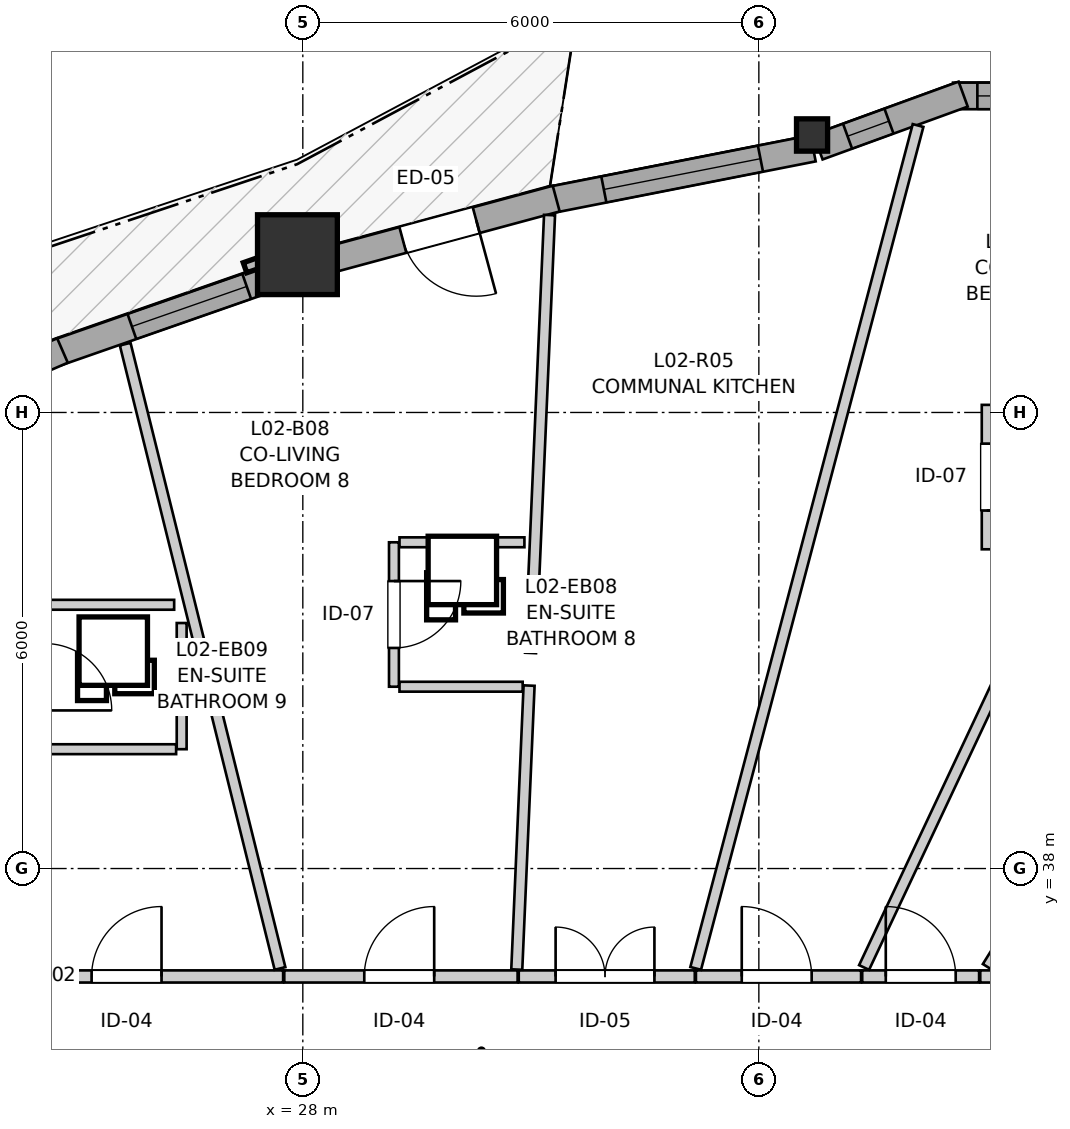
"""IFC4 building model, lengths in metres.
Left out: names, types, materials, properties, quantities, classifications, styles, units other than length and angle.
Written with IfcOpenShell. Run it as: python <this file> out.ifc"""

import sys

from ifc_helpers import new_model, si_unit, direction, frame, frame_2d, origin, origin_2d, place, context, subcontext, project, spatial, rectangle, i_section, extrude, source, transform, mapped, element, fill, save


model = new_model("IFC4")
c1 = context("Model", 3, precision=1e-05, world=origin(), true_north=direction((0.0, 1.0)))
c2 = subcontext(c1, "Body", "Model", "MODEL_VIEW")
j1 = project(units=[si_unit("LENGTHUNIT", "METRE"), si_unit("PLANEANGLEUNIT", "RADIAN")], contexts=[c1])
p1 = place(None, origin())
s1 = spatial("IfcSite", under=j1, at=p1, CompositionType="ELEMENT")
p2 = place(p1, origin())
s2 = spatial("IfcBuilding", under=s1, at=p2, CompositionType="ELEMENT")
p3 = place(p2, frame((0.0, 0.0, 11.0)))
s3 = spatial("IfcBuildingStorey", under=s2, at=p3, CompositionType="ELEMENT", Elevation=11.0)
m1 = source(origin(), c2, "Body", "SweptSolid", [
    extrude(i_section(OverallWidth=0.409, OverallDepth=0.425, WebThickness=0.03, FlangeThickness=0.048, FilletRadius=0.015, at=origin_2d()), origin(), (0.0, 0.0, 1.0), 2.94),
])
p4 = place(p3, frame((34.7, 47.651, 0.0), z_axis=(0.0, 0.0, 1.0), x_axis=(1.0, 0.0, 0.0)))
e1 = element("IfcColumn", 1, at=p4, inside=s3, PredefinedType="PILASTER", context=c2, shape_type="MappedRepresentation", body=[
    mapped(m1, transform((0.0, 0.0, 0.0), x_axis=(1.0, 0.0, 0.0), y_axis=(0.0, 1.0, 0.0), z_axis=(0.0, 0.0, 1.0), scale=1.0)),
])
m2 = source(origin(), c2, "Body", "SweptSolid", [
    extrude(rectangle(XDim=1.05, YDim=1.05, at=origin_2d()), origin(), (0.0, 0.0, 1.0), 2.94),
])
p5 = place(p3, frame((27.929, 46.076, 0.0), z_axis=(0.0, 0.0, 1.0), x_axis=(1.0, 0.0, 0.0)))
e2 = element("IfcColumn", 2, at=p5, inside=s3, PredefinedType="COLUMN", context=c2, shape_type="MappedRepresentation", body=[
    mapped(m2, transform((0.0, 0.0, 0.0), x_axis=(1.0, 0.0, 0.0), y_axis=(0.0, 1.0, 0.0), z_axis=(0.0, 0.0, 1.0), scale=1.0)),
])
p6 = place(p3, frame((38.645, 48.165, 0.0), z_axis=(0.0, 0.0, 1.0), x_axis=(-1.0, 0.0, 0.0)))
e3 = element("IfcWall", 3, at=p6, inside=s3, PredefinedType="SOLIDWALL", context=c2, shape_type="SweptSolid", body=[
    extrude(rectangle(XDim=2.091, YDim=0.35, at=frame_2d((1.045, 0.0))), origin(), (0.0, 0.0, 1.0), 2.42),
])
p7 = place(p6, frame((0.32, 0.0, 0.82)))
e4 = element("IfcOpeningElement", 4, at=p7, cuts=e3, PredefinedType="OPENING", context=c2, shape_type="SweptSolid", body=[
    extrude(rectangle(XDim=1.45, YDim=1.25, at=frame_2d((0.725, 0.625))), frame((0.0, 0.185, 0.0), z_axis=(0.0, -1.0, 0.0), x_axis=(1.0, 0.0, 0.0)), (0.0, 0.0, 1.0), 0.37),
])
p8 = place(p3, frame((36.688, 48.188, 0.0), z_axis=(0.0, 0.0, 1.0), x_axis=(-0.939653047052, -0.342128851701, 0.0)))
e5 = element("IfcWall", 5, at=p8, inside=s3, PredefinedType="SOLIDWALL", context=c2, shape_type="SweptSolid", body=[
    extrude(rectangle(XDim=2.032, YDim=0.35, at=frame_2d((1.016, 0.0))), origin(), (0.0, 0.0, 1.0), 2.42),
])
p9 = place(p8, frame((1.039, 0.0, 0.82)))
e6 = element("IfcOpeningElement", 6, at=p9, cuts=e5, PredefinedType="OPENING", context=c2, shape_type="SweptSolid", body=[
    extrude(rectangle(XDim=0.58, YDim=1.35, at=frame_2d((0.29, 0.675))), frame((0.0, 0.185, 0.0), z_axis=(0.0, -1.0, 0.0), x_axis=(1.0, 0.0, 0.0)), (0.0, 0.0, 1.0), 0.37),
])
p10 = place(p3, frame((34.714, 47.475, 0.0), z_axis=(0.0, 0.0, 1.0), x_axis=(-0.981221268425, -0.192885516282, 0.0)))
e7 = element("IfcWall", 7, at=p10, inside=s3, PredefinedType="SOLIDWALL", context=c2, shape_type="SweptSolid", body=[
    extrude(rectangle(XDim=3.533, YDim=0.35, at=frame_2d((1.766, 0.0))), origin(), (0.0, 0.0, 1.0), 2.42),
])
p11 = place(p10, frame((0.706, 0.0, 0.82)))
e8 = element("IfcOpeningElement", 8, at=p11, cuts=e7, PredefinedType="OPENING", context=c2, shape_type="SweptSolid", body=[
    extrude(rectangle(XDim=2.1, YDim=1.4, at=frame_2d((1.05, 0.7))), frame((0.0, 0.185, 0.0), z_axis=(0.0, -1.0, 0.0), x_axis=(1.0, 0.0, 0.0)), (0.0, 0.0, 1.0), 0.37),
])
p12 = place(p3, frame((31.333, 46.814, 0.0), z_axis=(0.0, 0.0, 1.0), x_axis=(-0.965456905924, -0.260562780926, 0.0)))
e9 = element("IfcWall", 9, at=p12, inside=s3, PredefinedType="SOLIDWALL", context=c2, shape_type="SweptSolid", body=[
    extrude(rectangle(XDim=3.179, YDim=0.35, at=frame_2d((1.59, 0.0))), origin(), (0.0, 0.0, 1.0), 2.42),
])
p13 = place(p12, frame((1.09, 0.0, 0.0)))
e10 = element("IfcOpeningElement", 10, at=p13, cuts=e9, PredefinedType="OPENING", context=c2, shape_type="SweptSolid", body=[
    extrude(rectangle(XDim=1.0, YDim=2.1, at=frame_2d((0.5, 1.05))), frame((0.0, 0.185, 0.0), z_axis=(0.0, -1.0, 0.0), x_axis=(1.0, 0.0, 0.0)), (0.0, 0.0, 1.0), 0.37),
])
p14 = place(p3, frame((27.703, 45.812, 0.0), z_axis=(0.0, 0.0, 1.0), x_axis=(-0.944149283204, -0.329518028377, 0.0)))
e11 = element("IfcWall", 11, at=p14, inside=s3, PredefinedType="SOLIDWALL", context=c2, shape_type="SweptSolid", body=[
    extrude(rectangle(XDim=3.123, YDim=0.35, at=frame_2d((1.562, 0.0))), origin(), (0.0, 0.0, 1.0), 2.42),
])
p15 = place(p14, frame((0.468, 0.0, 0.82)))
e12 = element("IfcOpeningElement", 12, at=p15, cuts=e11, PredefinedType="OPENING", context=c2, shape_type="SweptSolid", body=[
    extrude(rectangle(XDim=1.6, YDim=1.35, at=frame_2d((0.8, 0.675))), frame((0.0, 0.185, 0.0), z_axis=(0.0, -1.0, 0.0), x_axis=(1.0, 0.0, 0.0)), (0.0, 0.0, 1.0), 0.37),
])
p16 = place(p3, frame((24.838, 44.815, 0.0), z_axis=(0.0, 0.0, 1.0), x_axis=(-0.917087357706, -0.398686315712, 0.0)))
e13 = element("IfcWall", 13, at=p16, inside=s3, PredefinedType="SOLIDWALL", context=c2, shape_type="SweptSolid", body=[
    extrude(rectangle(XDim=3.365, YDim=0.35, at=frame_2d((1.683, 0.0))), origin(), (0.0, 0.0, 1.0), 2.42),
])
p17 = place(p16, frame((0.992, 0.0, 0.82)))
e14 = element("IfcOpeningElement", 14, at=p17, cuts=e13, PredefinedType="OPENING", context=c2, shape_type="SweptSolid", body=[
    extrude(rectangle(XDim=1.4, YDim=1.35, at=frame_2d((0.7, 0.675))), frame((0.0, 0.185, 0.0), z_axis=(0.0, -1.0, 0.0), x_axis=(1.0, 0.0, 0.0)), (0.0, 0.0, 1.0), 0.37),
])
p18 = place(p3, frame((23.618, 36.58, 0.0), z_axis=(0.0, 0.0, 1.0), x_axis=(1.0, 0.0, 0.0)))
e15 = element("IfcWall", 15, at=p18, inside=s3, PredefinedType="PARTITIONING", context=c2, shape_type="SweptSolid", body=[
    extrude(rectangle(XDim=4.123, YDim=0.16, at=frame_2d((2.062, 0.0))), origin(), (0.0, 0.0, 1.0), 2.548),
])
p19 = place(p18, frame((1.603, 0.0, 0.0)))
e16 = element("IfcOpeningElement", 16, at=p19, cuts=e15, PredefinedType="OPENING", context=c2, shape_type="SweptSolid", body=[
    extrude(rectangle(XDim=0.92, YDim=2.1, at=frame_2d((0.46, 1.05))), frame((0.0, 0.09, 0.0), z_axis=(0.0, -1.0, 0.0), x_axis=(1.0, 0.0, 0.0)), (0.0, 0.0, 1.0), 0.18),
])
p20 = place(p3, frame((27.756, 36.58, 0.0), z_axis=(0.0, 0.0, 1.0), x_axis=(1.0, 0.0, 0.0)))
e17 = element("IfcWall", 17, at=p20, inside=s3, PredefinedType="PARTITIONING", context=c2, shape_type="SweptSolid", body=[
    extrude(rectangle(XDim=3.07, YDim=0.16, at=frame_2d((1.535, 0.0))), origin(), (0.0, 0.0, 1.0), 2.94),
])
p21 = place(p20, frame((1.052, 0.0, 0.0)))
e18 = element("IfcOpeningElement", 18, at=p21, cuts=e17, PredefinedType="OPENING", context=c2, shape_type="SweptSolid", body=[
    extrude(rectangle(XDim=0.92, YDim=2.1, at=frame_2d((0.46, 1.05))), frame((0.0, 0.09, 0.0), z_axis=(0.0, -1.0, 0.0), x_axis=(1.0, 0.0, 0.0)), (0.0, 0.0, 1.0), 0.18),
])
p22 = place(p3, frame((30.841, 36.58, 0.0), z_axis=(0.0, 0.0, 1.0), x_axis=(1.0, 0.0, 0.0)))
e19 = element("IfcWall", 19, at=p22, inside=s3, PredefinedType="PARTITIONING", context=c2, shape_type="SweptSolid", body=[
    extrude(rectangle(XDim=2.316, YDim=0.16, at=frame_2d((1.158, 0.0))), origin(), (0.0, 0.0, 1.0), 2.94),
])
p23 = place(p22, frame((0.485, 0.0, 0.0)))
e20 = element("IfcOpeningElement", 20, at=p23, cuts=e19, PredefinedType="OPENING", context=c2, shape_type="SweptSolid", body=[
    extrude(rectangle(XDim=1.3, YDim=2.1, at=frame_2d((0.65, 1.05))), frame((0.0, 0.09, 0.0), z_axis=(0.0, -1.0, 0.0), x_axis=(1.0, 0.0, 0.0)), (0.0, 0.0, 1.0), 0.18),
])
p24 = place(p3, frame((33.172, 36.58, 0.0), z_axis=(0.0, 0.0, 1.0), x_axis=(1.0, 0.0, 0.0)))
e21 = element("IfcWall", 21, at=p24, inside=s3, PredefinedType="PARTITIONING", context=c2, shape_type="SweptSolid", body=[
    extrude(rectangle(XDim=2.173, YDim=0.16, at=frame_2d((1.086, 0.0))), origin(), (0.0, 0.0, 1.0), 2.94),
])
p25 = place(p24, frame((0.603, 0.0, 0.0)))
e22 = element("IfcOpeningElement", 22, at=p25, cuts=e21, PredefinedType="OPENING", context=c2, shape_type="SweptSolid", body=[
    extrude(rectangle(XDim=0.92, YDim=2.1, at=frame_2d((0.46, 1.05))), frame((0.0, 0.09, 0.0), z_axis=(0.0, -1.0, 0.0), x_axis=(1.0, 0.0, 0.0)), (0.0, 0.0, 1.0), 0.18),
])
p26 = place(p3, frame((36.998, 44.1, 0.0), z_axis=(0.0, 0.0, 1.0), x_axis=(0.0, -1.0, 0.0)))
e23 = element("IfcWall", 23, at=p26, inside=s3, PredefinedType="PARTITIONING", context=c2, shape_type="SweptSolid", body=[
    extrude(rectangle(XDim=1.9, YDim=0.13, at=frame_2d((0.95, 0.0))), origin(), (0.0, 0.0, 1.0), 2.94),
])
p27 = place(p26, frame((0.51, 0.0, 0.0)))
e24 = element("IfcOpeningElement", 24, at=p27, cuts=e23, PredefinedType="OPENING", context=c2, shape_type="SweptSolid", body=[
    extrude(rectangle(XDim=0.88, YDim=2.05, at=frame_2d((0.44, 1.025))), frame((0.0, 0.075, 0.0), z_axis=(0.0, -1.0, 0.0), x_axis=(1.0, 0.0, 0.0)), (0.0, 0.0, 1.0), 0.15),
])
p28 = place(p3, frame((29.199, 42.292, 0.0), z_axis=(0.0, 0.0, 1.0), x_axis=(0.0, -1.0, 0.0)))
e25 = element("IfcWall", 25, at=p28, inside=s3, PredefinedType="PARTITIONING", context=c2, shape_type="SweptSolid", body=[
    extrude(rectangle(XDim=1.9, YDim=0.13, at=frame_2d((0.95, 0.0))), origin(), (0.0, 0.0, 1.0), 2.94),
])
p29 = place(p28, frame((0.51, 0.0, 0.0)))
e26 = element("IfcOpeningElement", 26, at=p29, cuts=e25, PredefinedType="OPENING", context=c2, shape_type="SweptSolid", body=[
    extrude(rectangle(XDim=0.88, YDim=2.05, at=frame_2d((0.44, 1.025))), frame((0.0, 0.075, 0.0), z_axis=(0.0, -1.0, 0.0), x_axis=(1.0, 0.0, 0.0)), (0.0, 0.0, 1.0), 0.15),
])
p30 = place(p3, frame((36.913, 36.58, 0.0), z_axis=(0.0, 0.0, 1.0), x_axis=(1.0, 0.0, 0.0)))
e27 = element("IfcWall", 27, at=p30, inside=s3, PredefinedType="PARTITIONING", context=c2, shape_type="SweptSolid", body=[
    extrude(rectangle(XDim=1.767, YDim=0.16, at=frame_2d((0.883, 0.0))), origin(), (0.0, 0.0, 1.0), 2.94),
])
p31 = place(p30, frame((0.433, 0.0, 0.0)))
e28 = element("IfcOpeningElement", 28, at=p31, cuts=e27, PredefinedType="OPENING", context=c2, shape_type="SweptSolid", body=[
    extrude(rectangle(XDim=0.92, YDim=2.1, at=frame_2d((0.46, 1.05))), frame((0.0, 0.09, 0.0), z_axis=(0.0, -1.0, 0.0), x_axis=(1.0, 0.0, 0.0)), (0.0, 0.0, 1.0), 0.18),
])
p32 = place(p3, frame((35.36, 36.58, 0.0), z_axis=(0.0, 0.0, 1.0), x_axis=(1.0, 0.0, 0.0)))
e29 = element("IfcWall", 29, at=p32, inside=s3, PredefinedType="PARTITIONING", context=c2, shape_type="SweptSolid", body=[
    extrude(rectangle(XDim=1.538, YDim=0.16, at=frame_2d((0.769, 0.0))), origin(), (0.0, 0.0, 1.0), 2.94),
])
p33 = place(p32, frame((0.31, 0.0, 0.0)))
e30 = element("IfcOpeningElement", 30, at=p33, cuts=e29, PredefinedType="OPENING", context=c2, shape_type="SweptSolid", body=[
    extrude(rectangle(XDim=0.92, YDim=2.1, at=frame_2d((0.46, 1.05))), frame((0.0, 0.09, 0.0), z_axis=(0.0, -1.0, 0.0), x_axis=(1.0, 0.0, 0.0)), (0.0, 0.0, 1.0), 0.18),
])
p34 = place(p3, frame((33.169, 36.686, 0.0), z_axis=(0.0, 0.0, 1.0), x_axis=(0.255112522394, 0.966911371801, 0.0)))
e31 = element("IfcWall", 31, at=p34, inside=s3, PredefinedType="PARTITIONING", context=c2, shape_type="SweptSolid", body=[
    extrude(rectangle(XDim=11.469, YDim=0.145, at=frame_2d((5.734, 0.0))), origin(), (0.0, 0.0, 1.0), 2.94),
])
p35 = place(p3, frame((37.009, 36.705, 0.0), z_axis=(0.0, 0.0, 1.0), x_axis=(0.528183829193, 0.849130050451, 0.0)))
e32 = element("IfcWall", 32, at=p35, inside=s3, PredefinedType="PARTITIONING", context=c2, shape_type="SweptSolid", body=[
    extrude(rectangle(XDim=10.005, YDim=0.145, at=frame_2d((5.003, 0.0))), origin(), (0.0, 0.0, 1.0), 2.94),
])
p36 = place(p3, frame((25.663, 44.899, 0.0), z_axis=(0.0, 0.0, 1.0), x_axis=(0.240695577024, -0.970600658974, 0.0)))
e33 = element("IfcWall", 33, at=p36, inside=s3, PredefinedType="PARTITIONING", context=c2, shape_type="SweptSolid", body=[
    extrude(rectangle(XDim=8.462, YDim=0.145, at=frame_2d((4.231, 0.0))), origin(), (0.0, 0.0, 1.0), 2.94),
])
p37 = place(p3, frame((35.385, 36.698, 0.0), z_axis=(0.0, 0.0, 1.0), x_axis=(0.425687116038, 0.904870421242, 0.0)))
e34 = element("IfcWall", 34, at=p37, inside=s3, PredefinedType="PARTITIONING", context=c2, shape_type="SweptSolid", body=[
    extrude(rectangle(XDim=6.097, YDim=0.145, at=frame_2d((3.049, 0.0))), origin(), (0.0, 0.0, 1.0), 2.94),
])
p38 = place(p3, frame((30.996, 40.836, 0.0), z_axis=(0.0, 0.0, 1.0), x_axis=(0.043354544378, 0.999059749706, 0.0)))
e35 = element("IfcWall", 35, at=p38, inside=s3, PredefinedType="PARTITIONING", context=c2, shape_type="SweptSolid", body=[
    extrude(rectangle(XDim=5.766, YDim=0.145, at=frame_2d((2.883, 0.0))), origin(), (0.0, 0.0, 1.0), 2.94),
])
p39 = place(p3, frame((30.815, 36.671, 0.0), z_axis=(0.0, 0.0, 1.0), x_axis=(0.043352224588, 0.999059850371, 0.0)))
e36 = element("IfcWall", 36, at=p39, inside=s3, PredefinedType="PARTITIONING", context=c2, shape_type="SweptSolid", body=[
    extrude(rectangle(XDim=3.739, YDim=0.145, at=frame_2d((1.87, 0.0))), origin(), (0.0, 0.0, 1.0), 2.94),
])
p40 = place(p3, frame((26.406, 39.57, 0.0), z_axis=(0.0, 0.0, 1.0), x_axis=(0.0, 1.0, 0.0)))
e37 = element("IfcWall", 37, at=p40, inside=s3, PredefinedType="PARTITIONING", context=c2, shape_type="SweptSolid", body=[
    extrude(rectangle(XDim=1.66, YDim=0.13, at=frame_2d((0.83, 0.0))), origin(), (0.0, 0.0, 1.0), 2.94),
])
p41 = place(p3, frame((29.272, 42.292, 0.0), z_axis=(0.0, 0.0, 1.0), x_axis=(1.0, 0.0, 0.0)))
e38 = element("IfcWall", 38, at=p41, inside=s3, PredefinedType="PARTITIONING", context=c2, shape_type="SweptSolid", body=[
    extrude(rectangle(XDim=1.644, YDim=0.13, at=frame_2d((0.822, 0.0))), origin(), (0.0, 0.0, 1.0), 2.508),
])
p42 = place(p3, frame((24.679, 41.47, 0.0), z_axis=(0.0, 0.0, 1.0), x_axis=(1.0, 0.0, 0.0)))
e39 = element("IfcWall", 39, at=p42, inside=s3, PredefinedType="PARTITIONING", context=c2, shape_type="SweptSolid", body=[
    extrude(rectangle(XDim=1.628, YDim=0.13, at=frame_2d((0.814, 0.0))), origin(), (0.0, 0.0, 1.0), 2.508),
])
p43 = place(p3, frame((24.679, 39.57, 0.0), z_axis=(0.0, 0.0, 1.0), x_axis=(1.0, 0.0, 0.0)))
e40 = element("IfcWall", 40, at=p43, inside=s3, PredefinedType="PARTITIONING", context=c2, shape_type="SweptSolid", body=[
    extrude(rectangle(XDim=1.654, YDim=0.13, at=frame_2d((0.827, 0.0))), origin(), (0.0, 0.0, 1.0), 2.94),
])
p44 = place(p3, frame((29.272, 40.392, 0.0), z_axis=(0.0, 0.0, 1.0), x_axis=(1.0, 0.0, 0.0)))
e41 = element("IfcWall", 41, at=p44, inside=s3, PredefinedType="PARTITIONING", context=c2, shape_type="SweptSolid", body=[
    extrude(rectangle(XDim=1.621, YDim=0.13, at=frame_2d((0.81, 0.0))), origin(), (0.0, 0.0, 1.0), 2.94),
])
m3 = source(origin(), c2, "Body", "SweptSolid", [
    extrude(rectangle(XDim=1.45, YDim=1.25, at=frame_2d((0.725, 0.625))), frame((0.0, 0.03, 0.0), z_axis=(0.0, -1.0, 0.0), x_axis=(1.0, 0.0, 0.0)), (0.0, 0.0, 1.0), 0.06),
])
p45 = place(p7, origin())
e42 = element("IfcWindow", 42, at=p45, inside=s3, PartitioningType="SINGLE_PANEL", PredefinedType="WINDOW", context=c2, shape_type="MappedRepresentation", body=[
    mapped(m3, transform((0.0, 0.0, 0.0), x_axis=(1.0, 0.0, 0.0), y_axis=(0.0, 1.0, 0.0), z_axis=(0.0, 0.0, 1.0), scale=1.0)),
])
fill(e4, e42)
m4 = source(origin(), c2, "Body", "SweptSolid", [
    extrude(rectangle(XDim=0.58, YDim=1.35, at=frame_2d((0.29, 0.675))), frame((0.0, 0.03, 0.0), z_axis=(0.0, -1.0, 0.0), x_axis=(1.0, 0.0, 0.0)), (0.0, 0.0, 1.0), 0.06),
])
p46 = place(p9, origin())
e43 = element("IfcWindow", 43, at=p46, inside=s3, PartitioningType="SINGLE_PANEL", PredefinedType="WINDOW", context=c2, shape_type="MappedRepresentation", body=[
    mapped(m4, transform((0.0, 0.0, 0.0), x_axis=(1.0, 0.0, 0.0), y_axis=(0.0, 1.0, 0.0), z_axis=(0.0, 0.0, 1.0), scale=1.0)),
])
fill(e6, e43)
m5 = source(origin(), c2, "Body", "SweptSolid", [
    extrude(rectangle(XDim=2.1, YDim=1.4, at=frame_2d((1.05, 0.7))), frame((0.0, 0.03, 0.0), z_axis=(0.0, -1.0, 0.0), x_axis=(1.0, 0.0, 0.0)), (0.0, 0.0, 1.0), 0.06),
])
p47 = place(p11, origin())
e44 = element("IfcWindow", 44, at=p47, inside=s3, PartitioningType="SINGLE_PANEL", PredefinedType="WINDOW", context=c2, shape_type="MappedRepresentation", body=[
    mapped(m5, transform((0.0, 0.0, 0.0), x_axis=(1.0, 0.0, 0.0), y_axis=(0.0, 1.0, 0.0), z_axis=(0.0, 0.0, 1.0), scale=1.0)),
])
fill(e8, e44)
m6 = source(origin(), c2, "Body", "SweptSolid", [
    extrude(rectangle(XDim=1.6, YDim=1.35, at=frame_2d((0.8, 0.675))), frame((0.0, 0.03, 0.0), z_axis=(0.0, -1.0, 0.0), x_axis=(1.0, 0.0, 0.0)), (0.0, 0.0, 1.0), 0.06),
])
p48 = place(p15, origin())
e45 = element("IfcWindow", 45, at=p48, inside=s3, PartitioningType="SINGLE_PANEL", PredefinedType="WINDOW", context=c2, shape_type="MappedRepresentation", body=[
    mapped(m6, transform((0.0, 0.0, 0.0), x_axis=(1.0, 0.0, 0.0), y_axis=(0.0, 1.0, 0.0), z_axis=(0.0, 0.0, 1.0), scale=1.0)),
])
fill(e12, e45)
m7 = source(origin(), c2, "Body", "SweptSolid", [
    extrude(rectangle(XDim=1.0, YDim=2.1, at=frame_2d((0.5, 1.05))), frame((0.0, 0.025, 0.0), z_axis=(0.0, -1.0, 0.0), x_axis=(1.0, 0.0, 0.0)), (0.0, 0.0, 1.0), 0.05),
])
p49 = place(p13, origin())
e46 = element("IfcDoor", 46, at=p49, inside=s3, OperationType="SINGLE_SWING_LEFT", PredefinedType="DOOR", context=c2, shape_type="MappedRepresentation", body=[
    mapped(m7, transform((0.0, 0.0, 0.0), x_axis=(1.0, 0.0, 0.0), y_axis=(0.0, 1.0, 0.0), z_axis=(0.0, 0.0, 1.0), scale=1.0)),
])
fill(e10, e46)
m8 = source(origin(), c2, "Body", "SweptSolid", [
    extrude(rectangle(XDim=0.92, YDim=2.1, at=frame_2d((0.46, 1.05))), frame((0.0, 0.025, 0.0), z_axis=(0.0, -1.0, 0.0), x_axis=(1.0, 0.0, 0.0)), (0.0, 0.0, 1.0), 0.05),
])
p50 = place(p19, origin())
e47 = element("IfcDoor", 47, at=p50, inside=s3, OperationType="SINGLE_SWING_RIGHT", PredefinedType="DOOR", context=c2, shape_type="MappedRepresentation", body=[
    mapped(m8, transform((0.0, 0.0, 0.0), x_axis=(1.0, 0.0, 0.0), y_axis=(0.0, 1.0, 0.0), z_axis=(0.0, 0.0, 1.0), scale=1.0)),
])
fill(e16, e47)
p51 = place(p21, origin())
e48 = element("IfcDoor", 48, at=p51, inside=s3, OperationType="SINGLE_SWING_RIGHT", PredefinedType="DOOR", context=c2, shape_type="MappedRepresentation", body=[
    mapped(m8, transform((0.0, 0.0, 0.0), x_axis=(1.0, 0.0, 0.0), y_axis=(0.0, 1.0, 0.0), z_axis=(0.0, 0.0, 1.0), scale=1.0)),
])
fill(e18, e48)
m9 = source(origin(), c2, "Body", "SweptSolid", [
    extrude(rectangle(XDim=1.3, YDim=2.1, at=frame_2d((0.65, 1.05))), frame((0.0, 0.025, 0.0), z_axis=(0.0, -1.0, 0.0), x_axis=(1.0, 0.0, 0.0)), (0.0, 0.0, 1.0), 0.05),
])
p52 = place(p23, origin())
e49 = element("IfcDoor", 49, at=p52, inside=s3, OperationType="DOUBLE_DOOR_SINGLE_SWING", PredefinedType="DOOR", context=c2, shape_type="MappedRepresentation", body=[
    mapped(m9, transform((0.0, 0.0, 0.0), x_axis=(1.0, 0.0, 0.0), y_axis=(0.0, 1.0, 0.0), z_axis=(0.0, 0.0, 1.0), scale=1.0)),
])
fill(e20, e49)
p53 = place(p25, origin())
e50 = element("IfcDoor", 50, at=p53, inside=s3, OperationType="SINGLE_SWING_LEFT", PredefinedType="DOOR", context=c2, shape_type="MappedRepresentation", body=[
    mapped(m8, transform((0.0, 0.0, 0.0), x_axis=(1.0, 0.0, 0.0), y_axis=(0.0, 1.0, 0.0), z_axis=(0.0, 0.0, 1.0), scale=1.0)),
])
fill(e22, e50)
m10 = source(origin(), c2, "Body", "SweptSolid", [
    extrude(rectangle(XDim=0.88, YDim=2.05, at=frame_2d((0.44, 1.025))), frame((0.0, 0.025, 0.0), z_axis=(0.0, -1.0, 0.0), x_axis=(1.0, 0.0, 0.0)), (0.0, 0.0, 1.0), 0.05),
])
p54 = place(p27, origin())
e51 = element("IfcDoor", 51, at=p54, inside=s3, OperationType="SINGLE_SWING_RIGHT", PredefinedType="DOOR", context=c2, shape_type="MappedRepresentation", body=[
    mapped(m10, transform((0.0, 0.0, 0.0), x_axis=(1.0, 0.0, 0.0), y_axis=(0.0, 1.0, 0.0), z_axis=(0.0, 0.0, 1.0), scale=1.0)),
])
fill(e24, e51)
p55 = place(p29, origin())
e52 = element("IfcDoor", 52, at=p55, inside=s3, OperationType="SINGLE_SWING_LEFT", PredefinedType="DOOR", context=c2, shape_type="MappedRepresentation", body=[
    mapped(m10, transform((0.0, 0.0, 0.0), x_axis=(1.0, 0.0, 0.0), y_axis=(0.0, 1.0, 0.0), z_axis=(0.0, 0.0, 1.0), scale=1.0)),
])
fill(e26, e52)
p56 = place(p33, origin())
e53 = element("IfcDoor", 53, at=p56, inside=s3, OperationType="SINGLE_SWING_LEFT", PredefinedType="DOOR", context=c2, shape_type="MappedRepresentation", body=[
    mapped(m8, transform((0.0, 0.0, 0.0), x_axis=(1.0, 0.0, 0.0), y_axis=(0.0, 1.0, 0.0), z_axis=(0.0, 0.0, 1.0), scale=1.0)),
])
fill(e30, e53)
save(model, sys.argv[1])
